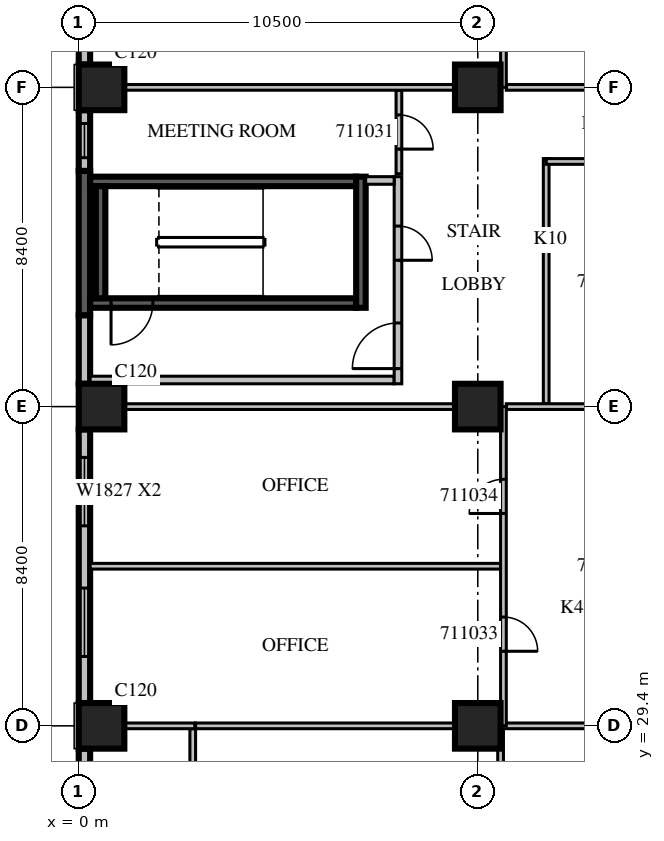
"""IFC4 building model, lengths in metres.
Left out: names, types, materials, properties, quantities, classifications, styles, units other than length and angle.
Written with IfcOpenShell. Run it as: python <this file> out.ifc"""

import sys

from ifc_helpers import new_model, si_unit, direction, frame, frame_2d, origin, origin_2d, place, context, subcontext, project, spatial, rectangle, extrude, source, transform, mapped, element, fill, save


model = new_model("IFC4")
c1 = context("Model", 3, precision=1e-05, world=origin(), true_north=direction((0.0, 1.0)))
c2 = subcontext(c1, "Body", "Model", "MODEL_VIEW")
j1 = project(units=[si_unit("LENGTHUNIT", "METRE"), si_unit("PLANEANGLEUNIT", "RADIAN")], contexts=[c1])
p1 = place(None, origin())
s1 = spatial("IfcSite", under=j1, at=p1, CompositionType="ELEMENT")
p2 = place(p1, origin())
s2 = spatial("IfcBuilding", under=s1, at=p2, CompositionType="ELEMENT")
p3 = place(p2, frame((0.0, 0.0, 57.3)))
s3 = spatial("IfcBuildingStorey", under=s2, at=p3, CompositionType="ELEMENT", Elevation=57.3)
m1 = source(origin(), c2, "Body", "SweptSolid", [
    extrude(rectangle(XDim=1.2, YDim=1.2, at=origin_2d()), origin(), (0.0, 0.0, 1.0), 4.2),
])
for number, where, z_axis, x_axis in (
    (1, (0.6, 29.4, 0.0), (0.0, 0.0, 1.0), (1.0, 0.0, 0.0)),
    (2, (10.5, 29.4, 0.0), (0.0, 0.0, 1.0), (1.0, 0.0, 0.0)),
    (3, (0.6, 37.8, 0.0), (0.0, 0.0, 1.0), (1.0, 0.0, 0.0)),
    (4, (10.5, 37.8, 0.0), (0.0, 0.0, 1.0), (1.0, 0.0, 0.0)),
    (5, (0.6, 46.2, 0.0), (0.0, 0.0, 1.0), (1.0, 0.0, 0.0)),
    (6, (10.5, 46.2, 0.0), (0.0, 0.0, 1.0), (1.0, 0.0, 0.0)),
):
    element("IfcColumn", number, at=place(p3, frame(where, z_axis=z_axis, x_axis=x_axis)), inside=s3, PredefinedType="COLUMN", context=c2, shape_type="MappedRepresentation", body=[
        mapped(m1, transform((0.0, 0.0, 0.0), scale=1.0)),
    ])
m2 = source(origin(), c2, "Body", "SweptSolid", [
    extrude(rectangle(XDim=4.68, YDim=0.3, at=frame_2d((2.34, 0.0))), origin(), (0.0, 0.0, 1.0), 3.8),
])
p4 = place(p3, frame((0.15, 51.48, 0.0), z_axis=(0.0, 0.0, 1.0), x_axis=(0.0, -1.0, 0.0)))
e7 = element("IfcWall", 7, at=p4, inside=s3, PredefinedType="STANDARD", context=c2, shape_type="MappedRepresentation", body=[
    mapped(m2, transform((0.0, 0.0, 0.0), scale=1.0)),
])
m3 = source(origin(), c2, "Body", "SweptSolid", [
    extrude(rectangle(XDim=1.6, YDim=0.3, at=frame_2d((0.8, 0.0))), origin(), (0.0, 0.0, 1.0), 3.8),
])
p5 = place(p3, frame((0.15, 45.6, 0.0), z_axis=(0.0, 0.0, 1.0), x_axis=(0.0, -1.0, 0.0)))
e8 = element("IfcWall", 8, at=p5, inside=s3, PredefinedType="STANDARD", context=c2, shape_type="MappedRepresentation", body=[
    mapped(m3, transform((0.0, 0.0, 0.0), scale=1.0)),
])
m4 = source(origin(), c2, "Body", "SweptSolid", [
    extrude(rectangle(XDim=0.9, YDim=2.7, at=frame_2d((0.45, 1.35))), frame((0.0, 0.16, 0.0), z_axis=(0.0, -1.0, 0.0), x_axis=(1.0, 0.0, 0.0)), (0.0, 0.0, 1.0), 0.32),
])
p6 = place(p5, frame((0.35, 0.0, 0.6)))
e9 = element("IfcOpeningElement", 9, at=p6, cuts=e8, PredefinedType="OPENING", context=c2, shape_type="MappedRepresentation", body=[
    mapped(m4, transform((0.0, 0.0, 0.0), scale=1.0)),
])
m5 = source(origin(), c2, "Body", "SweptSolid", [
    extrude(rectangle(XDim=3.8, YDim=0.3, at=frame_2d((1.9, 0.0))), origin(), (0.0, 0.0, 1.0), 3.8),
])
p7 = place(p3, frame((0.15, 44.0, 0.0), z_axis=(0.0, 0.0, 1.0), x_axis=(0.0, -1.0, 0.0)))
e10 = element("IfcWall", 10, at=p7, inside=s3, PredefinedType="SOLIDWALL", context=c2, shape_type="MappedRepresentation", body=[
    mapped(m5, transform((0.0, 0.0, 0.0), scale=1.0)),
])
m6 = source(origin(), c2, "Body", "SweptSolid", [
    extrude(rectangle(XDim=1.8, YDim=0.3, at=frame_2d((0.9, 0.0))), origin(), (0.0, 0.0, 1.0), 3.8),
])
p8 = place(p3, frame((0.15, 40.2, 0.0), z_axis=(0.0, 0.0, 1.0), x_axis=(0.0, -1.0, 0.0)))
e11 = element("IfcWall", 11, at=p8, inside=s3, PredefinedType="STANDARD", context=c2, shape_type="MappedRepresentation", body=[
    mapped(m6, transform((0.0, 0.0, 0.0), scale=1.0)),
])
m7 = source(origin(), c2, "Body", "SweptSolid", [
    extrude(rectangle(XDim=7.2, YDim=0.3, at=frame_2d((3.6, 0.0))), origin(), (0.0, 0.0, 1.0), 3.8),
])
p9 = place(p3, frame((0.15, 37.2, 0.0), z_axis=(0.0, 0.0, 1.0), x_axis=(0.0, -1.0, 0.0)))
e12 = element("IfcWall", 12, at=p9, inside=s3, PredefinedType="STANDARD", context=c2, shape_type="MappedRepresentation", body=[
    mapped(m7, transform((0.0, 0.0, 0.0), scale=1.0)),
])
m8 = source(origin(), c2, "Body", "SweptSolid", [
    extrude(rectangle(XDim=1.8, YDim=2.7, at=frame_2d((0.9, 1.35))), frame((0.0, 0.16, 0.0), z_axis=(0.0, -1.0, 0.0), x_axis=(1.0, 0.0, 0.0)), (0.0, 0.0, 1.0), 0.32),
])
p10 = place(p9, frame((0.738, 0.0, 0.6)))
e13 = element("IfcOpeningElement", 13, at=p10, cuts=e12, PredefinedType="OPENING", context=c2, shape_type="MappedRepresentation", body=[
    mapped(m8, transform((0.0, 0.0, 0.0), scale=1.0)),
])
p11 = place(p9, frame((4.175, 0.0, 0.6)))
e14 = element("IfcOpeningElement", 14, at=p11, cuts=e12, PredefinedType="OPENING", context=c2, shape_type="MappedRepresentation", body=[
    mapped(m8, transform((0.0, 0.0, 0.0), scale=1.0)),
])
p12 = place(p3, frame((0.15, 28.8, 0.0), z_axis=(0.0, 0.0, 1.0), x_axis=(0.0, -1.0, 0.0)))
e15 = element("IfcWall", 15, at=p12, inside=s3, PredefinedType="STANDARD", context=c2, shape_type="MappedRepresentation", body=[
    mapped(m7, transform((0.0, 0.0, 0.0), scale=1.0)),
])
m9 = source(origin(), c2, "Body", "SweptSolid", [
    extrude(rectangle(XDim=1.0, YDim=2.1, at=frame_2d((0.5, 1.05))), frame((0.0, 0.16, 0.0), z_axis=(0.0, -1.0, 0.0), x_axis=(1.0, 0.0, 0.0)), (0.0, 0.0, 1.0), 0.32),
])
p13 = place(p12, frame((2.68, 0.0, 0.0)))
e16 = element("IfcOpeningElement", 16, at=p13, cuts=e15, PredefinedType="OPENING", context=c2, shape_type="MappedRepresentation", body=[
    mapped(m9, transform((0.0, 0.0, 0.0), scale=1.0)),
])
m10 = source(origin(), c2, "Body", "SweptSolid", [
    extrude(rectangle(XDim=7.0, YDim=0.25, at=frame_2d((3.5, 0.0))), origin(), (0.0, 0.0, 1.0), 3.8),
])
p14 = place(p3, frame((0.3, 40.525, 0.0), z_axis=(0.0, 0.0, 1.0), x_axis=(1.0, 0.0, 0.0)))
e17 = element("IfcWall", 17, at=p14, inside=s3, PredefinedType="SOLIDWALL", context=c2, shape_type="MappedRepresentation", body=[
    mapped(m10, transform((0.0, 0.0, 0.0), scale=1.0)),
])
m11 = source(origin(), c2, "Body", "SweptSolid", [
    extrude(rectangle(XDim=1.1, YDim=2.1, at=frame_2d((0.55, 1.05))), frame((0.0, 0.135, 0.0), z_axis=(0.0, -1.0, 0.0), x_axis=(1.0, 0.0, 0.0)), (0.0, 0.0, 1.0), 0.27),
])
p15 = place(p14, frame((0.55, 0.0, 0.0)))
e18 = element("IfcOpeningElement", 18, at=p15, cuts=e17, PredefinedType="OPENING", context=c2, shape_type="MappedRepresentation", body=[
    mapped(m11, transform((0.0, 0.0, 0.0), scale=1.0)),
])
p16 = place(p3, frame((0.3, 43.725, 0.0), z_axis=(0.0, 0.0, 1.0), x_axis=(1.0, 0.0, 0.0)))
e19 = element("IfcWall", 19, at=p16, inside=s3, PredefinedType="SOLIDWALL", context=c2, shape_type="MappedRepresentation", body=[
    mapped(m10, transform((0.0, 0.0, 0.0), scale=1.0)),
])
m12 = source(origin(), c2, "Body", "SweptSolid", [
    extrude(rectangle(XDim=3.45, YDim=0.25, at=frame_2d((1.725, 0.0))), origin(), (0.0, 0.0, 1.0), 3.8),
])
p17 = place(p3, frame((7.425, 40.4, 0.0), z_axis=(0.0, 0.0, 1.0), x_axis=(0.0, 1.0, 0.0)))
e20 = element("IfcWall", 20, at=p17, inside=s3, PredefinedType="SOLIDWALL", context=c2, shape_type="MappedRepresentation", body=[
    mapped(m12, transform((0.0, 0.0, 0.0), scale=1.0)),
])
m13 = source(origin(), c2, "Body", "SweptSolid", [
    extrude(rectangle(XDim=2.95, YDim=0.25, at=frame_2d((1.475, 0.0))), origin(), (0.0, 0.0, 1.0), 3.8),
])
p18 = place(p3, frame((0.575, 40.65, 0.0), z_axis=(0.0, 0.0, 1.0), x_axis=(0.0, 1.0, 0.0)))
e21 = element("IfcWall", 21, at=p18, inside=s3, PredefinedType="SOLIDWALL", context=c2, shape_type="MappedRepresentation", body=[
    mapped(m13, transform((0.0, 0.0, 0.0), scale=1.0)),
])
m14 = source(origin(), c2, "Body", "SweptSolid", [
    extrude(rectangle(XDim=8.0, YDim=0.2, at=frame_2d((4.0, 0.0))), origin(), (0.0, 0.0, 1.0), 3.8),
])
p19 = place(p3, frame((0.3, 38.5, 0.0), z_axis=(0.0, 0.0, 1.0), x_axis=(1.0, 0.0, 0.0)))
e22 = element("IfcWall", 22, at=p19, inside=s3, PredefinedType="PARTITIONING", context=c2, shape_type="MappedRepresentation", body=[
    mapped(m14, transform((0.0, 0.0, 0.0), scale=1.0)),
])
m15 = source(origin(), c2, "Body", "SweptSolid", [
    extrude(rectangle(XDim=5.45, YDim=0.2, at=frame_2d((2.725, 0.0))), origin(), (0.0, 0.0, 1.0), 3.8),
])
p20 = place(p3, frame((8.4, 38.4, 0.0), z_axis=(0.0, 0.0, 1.0), x_axis=(0.0, 1.0, 0.0)))
e23 = element("IfcWall", 23, at=p20, inside=s3, PredefinedType="PARTITIONING", context=c2, shape_type="MappedRepresentation", body=[
    mapped(m15, transform((0.0, 0.0, 0.0), scale=1.0)),
])
m16 = source(origin(), c2, "Body", "SweptSolid", [
    extrude(rectangle(XDim=1.2, YDim=2.1, at=frame_2d((0.6, 1.05))), frame((0.0, 0.11, 0.0), z_axis=(0.0, -1.0, 0.0), x_axis=(1.0, 0.0, 0.0)), (0.0, 0.0, 1.0), 0.22),
])
p21 = place(p20, frame((0.4, 0.0, 0.0)))
e24 = element("IfcOpeningElement", 24, at=p21, cuts=e23, PredefinedType="OPENING", context=c2, shape_type="MappedRepresentation", body=[
    mapped(m16, transform((0.0, 0.0, 0.0), scale=1.0)),
])
m17 = source(origin(), c2, "Body", "SweptSolid", [
    extrude(rectangle(XDim=0.9, YDim=2.1, at=frame_2d((0.45, 1.05))), frame((0.0, 0.11, 0.0), z_axis=(0.0, -1.0, 0.0), x_axis=(1.0, 0.0, 0.0)), (0.0, 0.0, 1.0), 0.22),
])
p22 = place(p20, frame((3.25, 0.0, 0.0)))
e25 = element("IfcOpeningElement", 25, at=p22, cuts=e23, PredefinedType="OPENING", context=c2, shape_type="MappedRepresentation", body=[
    mapped(m17, transform((0.0, 0.0, 0.0), scale=1.0)),
])
m18 = source(origin(), c2, "Body", "SweptSolid", [
    extrude(rectangle(XDim=0.75, YDim=0.2, at=frame_2d((0.375, 0.0))), origin(), (0.0, 0.0, 1.0), 3.8),
])
p23 = place(p3, frame((7.55, 43.75, 0.0), z_axis=(0.0, 0.0, 1.0), x_axis=(1.0, 0.0, 0.0)))
e26 = element("IfcWall", 26, at=p23, inside=s3, PredefinedType="PARTITIONING", context=c2, shape_type="MappedRepresentation", body=[
    mapped(m18, transform((0.0, 0.0, 0.0), scale=1.0)),
])
m19 = source(origin(), c2, "Body", "SweptSolid", [
    extrude(rectangle(XDim=5.15, YDim=0.15, at=frame_2d((2.575, 0.0))), origin(), (0.0, 0.0, 1.0), 3.3),
])
p24 = place(p3, frame((11.1, 24.175, 0.0), z_axis=(0.0, 0.0, 1.0), x_axis=(0.0, 1.0, 0.0)))
e27 = element("IfcWall", 27, at=p24, inside=s3, PredefinedType="PARTITIONING", context=c2, shape_type="MappedRepresentation", body=[
    mapped(m19, transform((0.0, 0.0, 0.0), scale=1.0)),
])
m20 = source(origin(), c2, "Body", "SweptSolid", [
    extrude(rectangle(XDim=6.826, YDim=0.15, at=frame_2d((3.413, 0.0))), origin(), (0.0, 0.0, 1.0), 3.8),
])
p25 = place(p3, frame((9.901, 29.4, 0.0), z_axis=(0.0, 0.0, 1.0), x_axis=(-1.0, 0.0, 0.0)))
e28 = element("IfcWall", 28, at=p25, inside=s3, PredefinedType="PARTITIONING", context=c2, shape_type="MappedRepresentation", body=[
    mapped(m20, transform((0.0, 0.0, 0.0), scale=1.0)),
])
m21 = source(origin(), c2, "Body", "SweptSolid", [
    extrude(rectangle(XDim=3.601, YDim=0.15, at=frame_2d((1.8, 0.0))), origin(), (0.0, 0.0, 1.0), 3.8),
])
p26 = place(p3, frame((14.7, 29.4, 0.0), z_axis=(0.0, 0.0, 1.0), x_axis=(-1.0, 0.0, 0.0)))
e29 = element("IfcWall", 29, at=p26, inside=s3, PredefinedType="PARTITIONING", context=c2, shape_type="MappedRepresentation", body=[
    mapped(m21, transform((0.0, 0.0, 0.0), scale=1.0)),
])
m22 = source(origin(), c2, "Body", "SweptSolid", [
    extrude(rectangle(XDim=7.125, YDim=0.15, at=frame_2d((3.562, 0.0))), origin(), (0.0, 0.0, 1.0), 3.8),
])
p27 = place(p3, frame((3.0, 29.325, 0.0), z_axis=(0.0, 0.0, 1.0), x_axis=(0.0, -1.0, 0.0)))
e30 = element("IfcWall", 30, at=p27, inside=s3, PredefinedType="PARTITIONING", context=c2, shape_type="MappedRepresentation", body=[
    mapped(m22, transform((0.0, 0.0, 0.0), scale=1.0)),
])
m23 = source(origin(), c2, "Body", "SweptSolid", [
    extrude(rectangle(XDim=1.0, YDim=2.1, at=frame_2d((0.5, 1.05))), frame((0.0, 0.085, 0.0), z_axis=(0.0, -1.0, 0.0), x_axis=(1.0, 0.0, 0.0)), (0.0, 0.0, 1.0), 0.17),
])
p28 = place(p27, frame((5.675, 0.0, 0.0)))
e31 = element("IfcOpeningElement", 31, at=p28, cuts=e30, PredefinedType="OPENING", context=c2, shape_type="MappedRepresentation", body=[
    mapped(m23, transform((0.0, 0.0, 0.0), scale=1.0)),
])
m24 = source(origin(), c2, "Body", "SweptSolid", [
    extrude(rectangle(XDim=6.45, YDim=0.15, at=frame_2d((3.225, 0.0))), origin(), (0.0, 0.0, 1.0), 3.8),
])
p29 = place(p3, frame((12.3, 44.325, 0.0), z_axis=(0.0, 0.0, 1.0), x_axis=(0.0, -1.0, 0.0)))
e32 = element("IfcWall", 32, at=p29, inside=s3, PredefinedType="PARTITIONING", context=c2, shape_type="MappedRepresentation", body=[
    mapped(m24, transform((0.0, 0.0, 0.0), scale=1.0)),
])
p30 = place(p3, frame((14.775, 44.25, 0.0), z_axis=(0.0, 0.0, 1.0), x_axis=(-1.0, 0.0, 0.0)))
e33 = element("IfcWall", 33, at=p30, inside=s3, PredefinedType="PARTITIONING", context=c2, shape_type="SweptSolid", body=[
    extrude(rectangle(XDim=2.475, YDim=0.15, at=frame_2d((1.238, 0.0))), origin(), (0.0, 0.0, 1.0), 3.8),
])
m25 = source(origin(), c2, "Body", "SweptSolid", [
    extrude(rectangle(XDim=2.2, YDim=0.15, at=frame_2d((1.1, 0.0))), origin(), (0.0, 0.0, 1.0), 3.8),
])
p31 = place(p3, frame((8.425, 43.925, 0.0), z_axis=(0.0, 0.0, 1.0), x_axis=(0.0, 1.0, 0.0)))
e34 = element("IfcWall", 34, at=p31, inside=s3, PredefinedType="PARTITIONING", context=c2, shape_type="MappedRepresentation", body=[
    mapped(m25, transform((0.0, 0.0, 0.0), scale=1.0)),
])
m26 = source(origin(), c2, "Body", "SweptSolid", [
    extrude(rectangle(XDim=0.9, YDim=2.1, at=frame_2d((0.45, 1.05))), frame((0.0, 0.085, 0.0), z_axis=(0.0, -1.0, 0.0), x_axis=(1.0, 0.0, 0.0)), (0.0, 0.0, 1.0), 0.17),
])
p32 = place(p31, frame((0.65, 0.0, 0.0)))
e35 = element("IfcOpeningElement", 35, at=p32, cuts=e34, PredefinedType="OPENING", context=c2, shape_type="MappedRepresentation", body=[
    mapped(m26, transform((0.0, 0.0, 0.0), scale=1.0)),
])
m27 = source(origin(), c2, "Body", "SweptSolid", [
    extrude(rectangle(XDim=10.8, YDim=0.15, at=frame_2d((5.4, 0.0))), origin(), (0.0, 0.0, 1.0), 3.8),
])
p33 = place(p3, frame((11.1, 33.6, 0.0), z_axis=(0.0, 0.0, 1.0), x_axis=(-1.0, 0.0, 0.0)))
e36 = element("IfcWall", 36, at=p33, inside=s3, PredefinedType="PARTITIONING", context=c2, shape_type="MappedRepresentation", body=[
    mapped(m27, transform((0.0, 0.0, 0.0), scale=1.0)),
])
m28 = source(origin(), c2, "Body", "SweptSolid", [
    extrude(rectangle(XDim=1.856, YDim=0.15, at=frame_2d((0.928, 0.0))), origin(), (0.0, 0.0, 1.0), 3.8),
])
p34 = place(p3, frame((3.055, 29.4, 0.0), z_axis=(0.0, 0.0, 1.0), x_axis=(-1.0, 0.0, 0.0)))
e37 = element("IfcWall", 37, at=p34, inside=s3, PredefinedType="PARTITIONING", context=c2, shape_type="MappedRepresentation", body=[
    mapped(m28, transform((0.0, 0.0, 0.0), scale=1.0)),
])
m29 = source(origin(), c2, "Body", "SweptSolid", [
    extrude(rectangle(XDim=8.702, YDim=0.15, at=frame_2d((4.351, 0.0))), origin(), (0.0, 0.0, 1.0), 3.8),
])
p35 = place(p3, frame((9.901, 37.8, 0.0), z_axis=(0.0, 0.0, 1.0), x_axis=(-1.0, 0.0, 0.0)))
e38 = element("IfcWall", 38, at=p35, inside=s3, PredefinedType="PARTITIONING", context=c2, shape_type="MappedRepresentation", body=[
    mapped(m29, transform((0.0, 0.0, 0.0), scale=1.0)),
])
m30 = source(origin(), c2, "Body", "SweptSolid", [
    extrude(rectangle(XDim=3.45, YDim=0.15, at=frame_2d((1.725, 0.0))), origin(), (0.0, 0.0, 1.0), 3.8),
])
p36 = place(p3, frame((14.7, 37.8, 0.0), z_axis=(0.0, 0.0, 1.0), x_axis=(-1.0, 0.0, 0.0)))
e39 = element("IfcWall", 39, at=p36, inside=s3, PredefinedType="PARTITIONING", context=c2, shape_type="MappedRepresentation", body=[
    mapped(m30, transform((0.0, 0.0, 0.0), scale=1.0)),
])
m31 = source(origin(), c2, "Body", "SweptSolid", [
    extrude(rectangle(XDim=8.4, YDim=0.15, at=frame_2d((4.2, 0.0))), origin(), (0.0, 0.0, 1.0), 3.8),
])
p37 = place(p3, frame((11.175, 29.4, 0.0), z_axis=(0.0, 0.0, 1.0), x_axis=(0.0, 1.0, 0.0)))
e40 = element("IfcWall", 40, at=p37, inside=s3, PredefinedType="PARTITIONING", context=c2, shape_type="MappedRepresentation", body=[
    mapped(m31, transform((0.0, 0.0, 0.0), scale=1.0)),
])
p38 = place(p37, frame((1.962, 0.0, 0.0)))
e41 = element("IfcOpeningElement", 41, at=p38, cuts=e40, PredefinedType="OPENING", context=c2, shape_type="MappedRepresentation", body=[
    mapped(m26, transform((0.0, 0.0, 0.0), scale=1.0)),
])
p39 = place(p37, frame((5.588, 0.0, 0.0)))
e42 = element("IfcOpeningElement", 42, at=p39, cuts=e40, PredefinedType="OPENING", context=c2, shape_type="MappedRepresentation", body=[
    mapped(m26, transform((0.0, 0.0, 0.0), scale=1.0)),
])
p40 = place(p3, frame((9.901, 46.2, 0.0), z_axis=(0.0, 0.0, 1.0), x_axis=(-1.0, 0.0, 0.0)))
e43 = element("IfcWall", 43, at=p40, inside=s3, PredefinedType="PARTITIONING", context=c2, shape_type="MappedRepresentation", body=[
    mapped(m29, transform((0.0, 0.0, 0.0), scale=1.0)),
])
p41 = place(p3, frame((14.7, 46.2, 0.0), z_axis=(0.0, 0.0, 1.0), x_axis=(-1.0, 0.0, 0.0)))
e44 = element("IfcWall", 44, at=p41, inside=s3, PredefinedType="PARTITIONING", context=c2, shape_type="MappedRepresentation", body=[
    mapped(m30, transform((0.0, 0.0, 0.0), scale=1.0)),
])
m32 = source(origin(), c2, "Body", "SweptSolid", [
    extrude(rectangle(XDim=19.02, YDim=0.15, at=frame_2d((9.51, 0.0))), origin(), (0.0, 0.0, 1.0), 3.8),
])
p42 = place(p3, frame((11.175, 46.2, 0.0), z_axis=(0.0, 0.0, 1.0), x_axis=(0.0, 1.0, 0.0)))
e45 = element("IfcWall", 45, at=p42, inside=s3, PredefinedType="PARTITIONING", context=c2, shape_type="MappedRepresentation", body=[
    mapped(m32, transform((0.0, 0.0, 0.0), scale=1.0)),
])
p43 = place(p42, frame((2.487, 0.0, 0.0)))
e46 = element("IfcOpeningElement", 46, at=p43, cuts=e45, PredefinedType="OPENING", context=c2, shape_type="MappedRepresentation", body=[
    mapped(m26, transform((0.0, 0.0, 0.0), scale=1.0)),
])
p44 = place(p42, frame((8.367, 0.0, 0.0)))
e47 = element("IfcOpeningElement", 47, at=p44, cuts=e45, PredefinedType="OPENING", context=c2, shape_type="MappedRepresentation", body=[
    mapped(m26, transform((0.0, 0.0, 0.0), scale=1.0)),
])
p45 = place(p42, frame((16.094, 0.0, 0.0)))
e48 = element("IfcOpeningElement", 48, at=p45, cuts=e45, PredefinedType="OPENING", context=c2, shape_type="MappedRepresentation", body=[
    mapped(m26, transform((0.0, 0.0, 0.0), scale=1.0)),
])
m33 = source(origin(), c2, "Body", "SweptSolid", [
    extrude(rectangle(XDim=0.9, YDim=2.7, at=frame_2d((0.45, 1.35))), frame((0.0, 0.03, 0.0), z_axis=(0.0, -1.0, 0.0), x_axis=(1.0, 0.0, 0.0)), (0.0, 0.0, 1.0), 0.06),
])
p46 = place(p6, origin())
e49 = element("IfcWindow", 49, at=p46, inside=s3, PartitioningType="SINGLE_PANEL", PredefinedType="WINDOW", context=c2, shape_type="MappedRepresentation", body=[
    mapped(m33, transform((0.0, 0.0, 0.0), scale=1.0)),
])
fill(e9, e49)
m34 = source(origin(), c2, "Body", "SweptSolid", [
    extrude(rectangle(XDim=1.8, YDim=2.7, at=frame_2d((0.9, 1.35))), frame((0.0, 0.03, 0.0), z_axis=(0.0, -1.0, 0.0), x_axis=(1.0, 0.0, 0.0)), (0.0, 0.0, 1.0), 0.06),
])
p47 = place(p10, origin())
e50 = element("IfcWindow", 50, at=p47, inside=s3, PartitioningType="SINGLE_PANEL", PredefinedType="WINDOW", context=c2, shape_type="MappedRepresentation", body=[
    mapped(m34, transform((0.0, 0.0, 0.0), scale=1.0)),
])
fill(e13, e50)
p48 = place(p11, origin())
e51 = element("IfcWindow", 51, at=p48, inside=s3, PartitioningType="SINGLE_PANEL", PredefinedType="WINDOW", context=c2, shape_type="MappedRepresentation", body=[
    mapped(m34, transform((0.0, 0.0, 0.0), scale=1.0)),
])
fill(e14, e51)
m35 = source(origin(), c2, "Body", "SweptSolid", [
    extrude(rectangle(XDim=1.1, YDim=2.1, at=frame_2d((0.55, 1.05))), frame((0.0, 0.025, 0.0), z_axis=(0.0, -1.0, 0.0), x_axis=(1.0, 0.0, 0.0)), (0.0, 0.0, 1.0), 0.05),
])
p49 = place(p15, origin())
e52 = element("IfcDoor", 52, at=p49, inside=s3, OperationType="SINGLE_SWING_RIGHT", PredefinedType="DOOR", context=c2, shape_type="MappedRepresentation", body=[
    mapped(m35, transform((0.0, 0.0, 0.0), scale=1.0)),
])
fill(e18, e52)
m36 = source(origin(), c2, "Body", "SweptSolid", [
    extrude(rectangle(XDim=1.2, YDim=2.1, at=frame_2d((0.6, 1.05))), frame((0.0, 0.025, 0.0), z_axis=(0.0, -1.0, 0.0), x_axis=(1.0, 0.0, 0.0)), (0.0, 0.0, 1.0), 0.05),
])
p50 = place(p21, origin())
e53 = element("IfcDoor", 53, at=p50, inside=s3, OperationType="SINGLE_SWING_LEFT", PredefinedType="DOOR", context=c2, shape_type="MappedRepresentation", body=[
    mapped(m36, transform((0.0, 0.0, 0.0), scale=1.0)),
])
fill(e24, e53)
m37 = source(origin(), c2, "Body", "SweptSolid", [
    extrude(rectangle(XDim=0.9, YDim=2.1, at=frame_2d((0.45, 1.05))), frame((0.0, 0.025, 0.0), z_axis=(0.0, -1.0, 0.0), x_axis=(1.0, 0.0, 0.0)), (0.0, 0.0, 1.0), 0.05),
])
p51 = place(p22, origin())
e54 = element("IfcDoor", 54, at=p51, inside=s3, OperationType="SINGLE_SWING_RIGHT", PredefinedType="DOOR", context=c2, shape_type="MappedRepresentation", body=[
    mapped(m37, transform((0.0, 0.0, 0.0), scale=1.0)),
])
fill(e25, e54)
p52 = place(p32, origin())
e55 = element("IfcDoor", 55, at=p52, inside=s3, OperationType="SINGLE_SWING_RIGHT", PredefinedType="DOOR", context=c2, shape_type="MappedRepresentation", body=[
    mapped(m37, transform((0.0, 0.0, 0.0), scale=1.0)),
])
fill(e35, e55)
p53 = place(p38, origin())
e56 = element("IfcDoor", 56, at=p53, inside=s3, OperationType="SINGLE_SWING_RIGHT", PredefinedType="DOOR", context=c2, shape_type="MappedRepresentation", body=[
    mapped(m37, transform((0.0, 0.0, 0.0), scale=1.0)),
])
fill(e41, e56)
p54 = place(p39, origin())
e57 = element("IfcDoor", 57, at=p54, inside=s3, OperationType="SINGLE_SWING_LEFT", PredefinedType="DOOR", context=c2, shape_type="MappedRepresentation", body=[
    mapped(m37, transform((0.0, 0.0, 0.0), scale=1.0)),
])
fill(e42, e57)
save(model, sys.argv[1])
